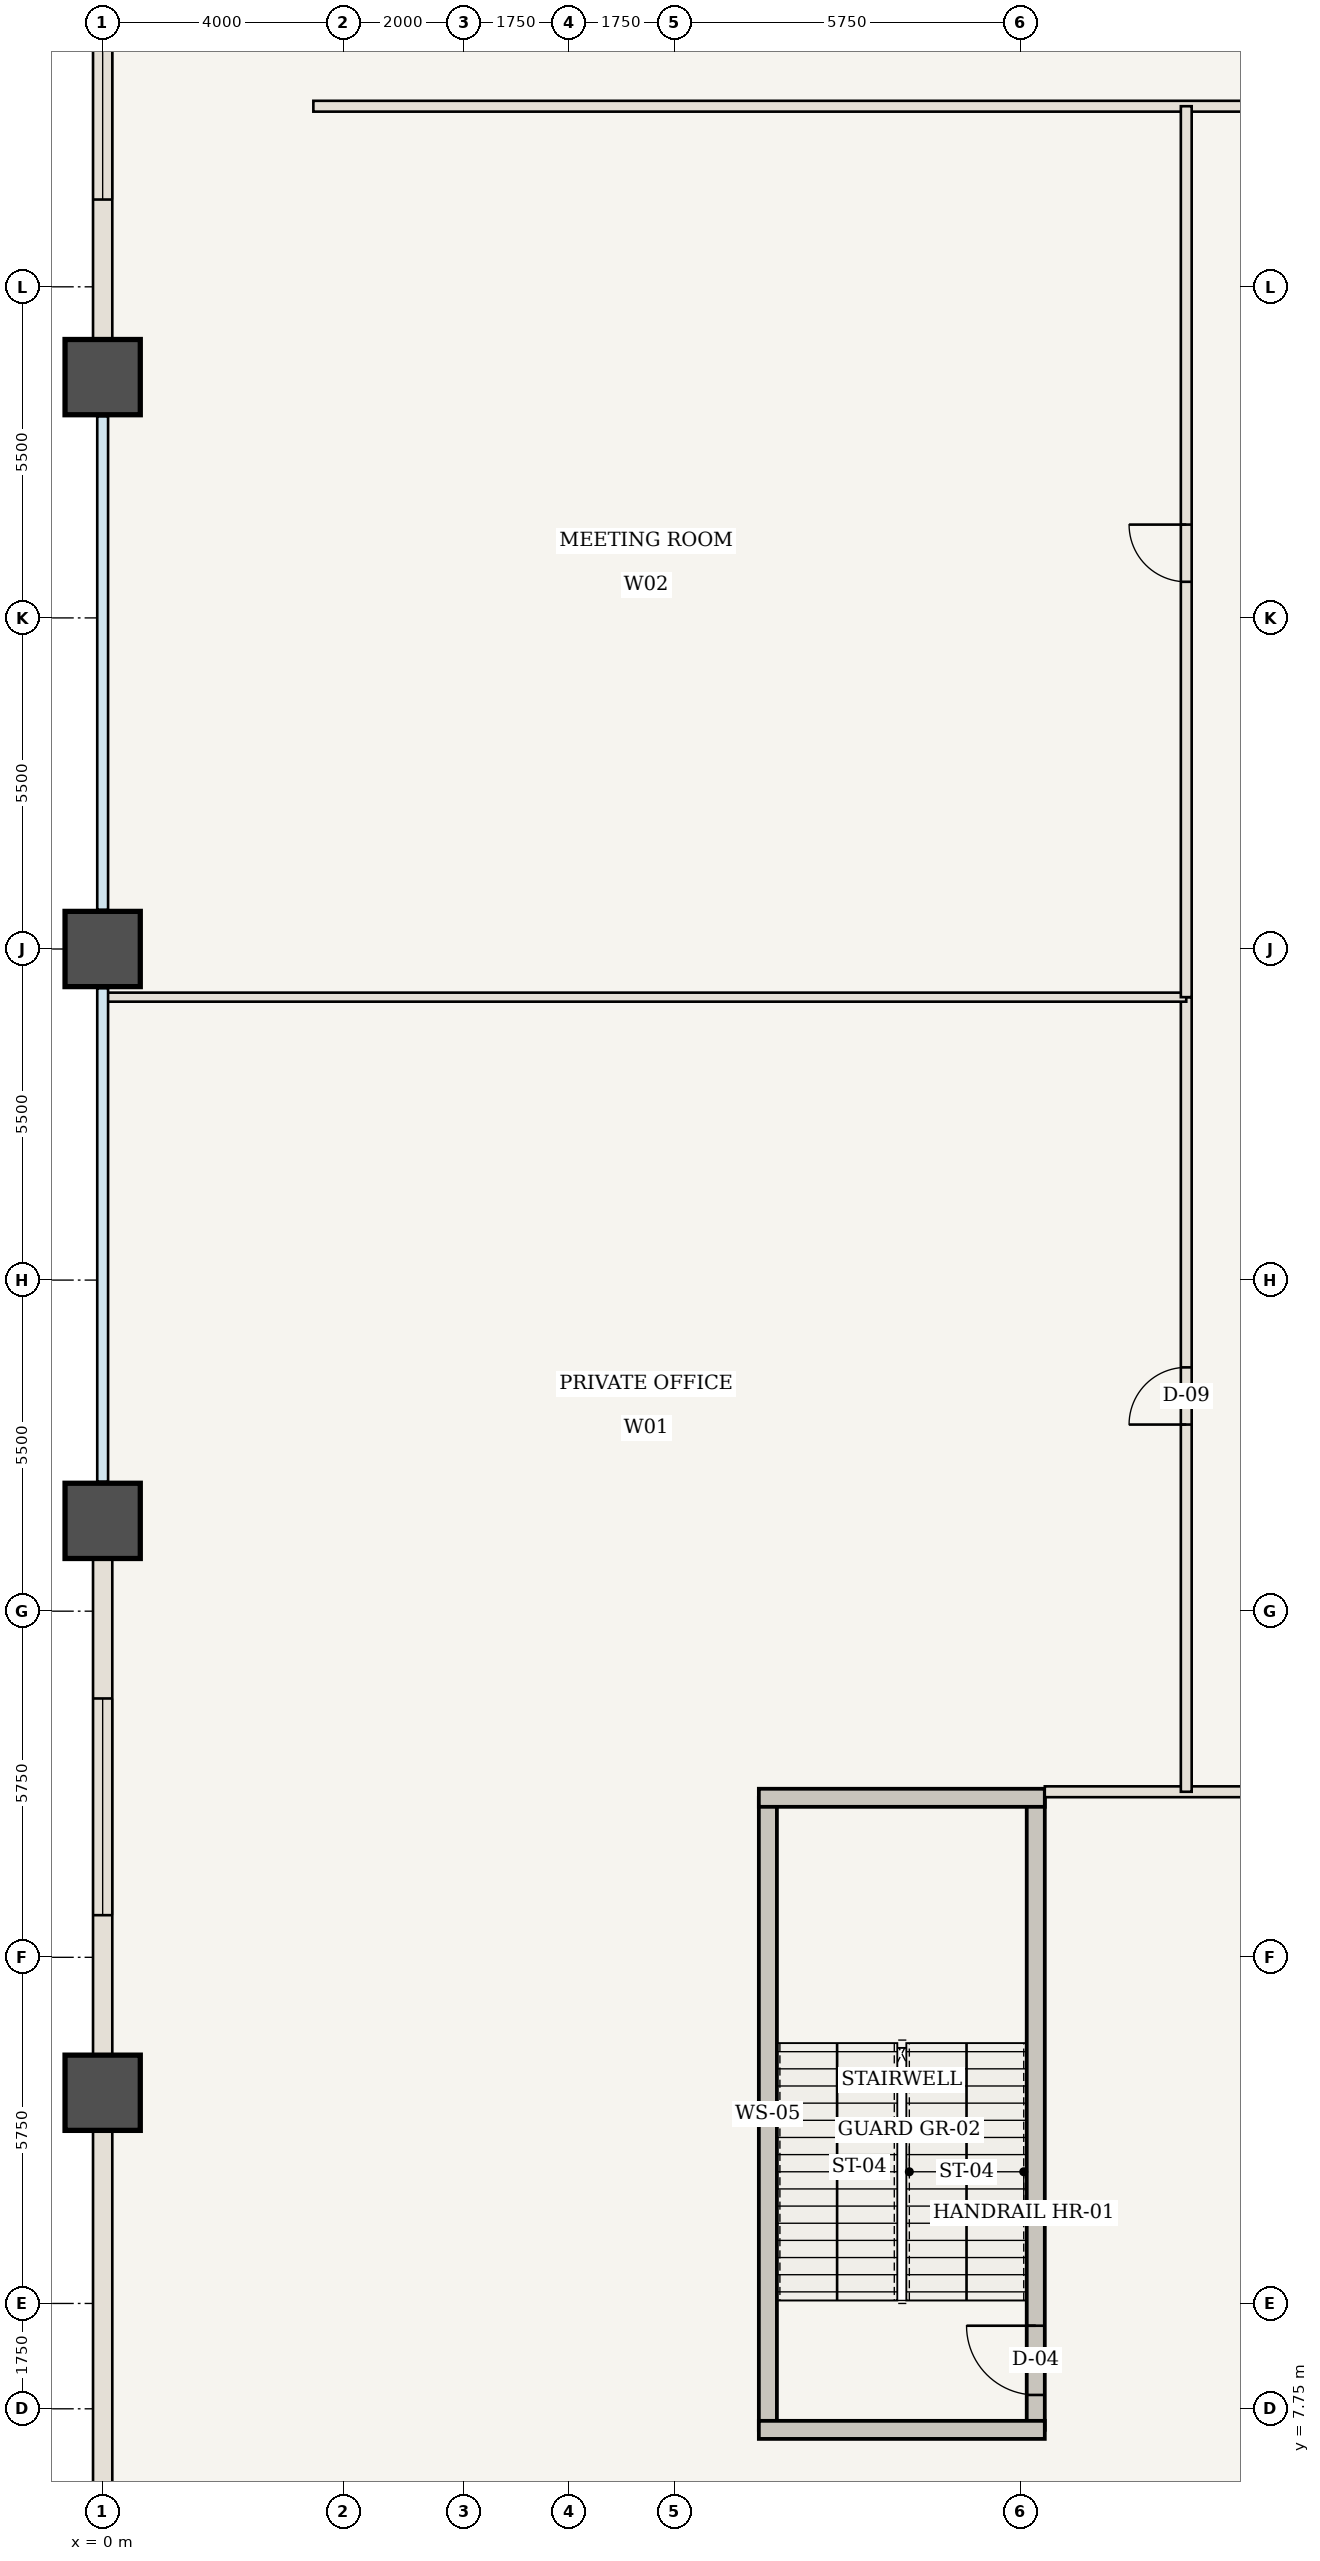
"""IFC4 building model, lengths in metres.
Left out: names, types, materials, properties, quantities, classifications, styles, units other than length and angle.
Written with IfcOpenShell. Run it as: python <this file> out.ifc"""

import sys

from ifc_helpers import new_model, si_unit, direction, frame, frame_2d, origin, origin_2d, place, context, subcontext, project, spatial, rectangle, extrude, element, fill, save


model = new_model("IFC4")
c1 = context("Model", 3, precision=1e-05, world=origin(), true_north=direction((0.0, 1.0)))
c2 = subcontext(c1, "Body", "Model", "MODEL_VIEW")
j1 = project(units=[si_unit("LENGTHUNIT", "METRE"), si_unit("PLANEANGLEUNIT", "RADIAN")], contexts=[c1])
p1 = place(None, origin())
s1 = spatial("IfcSite", under=j1, at=p1, CompositionType="ELEMENT")
p2 = place(p1, origin())
s2 = spatial("IfcBuilding", under=s1, at=p2, CompositionType="ELEMENT")
p3 = place(p2, frame((0.0, 0.0, 6.65)))
s3 = spatial("IfcBuildingStorey", under=s2, at=p3, CompositionType="ELEMENT", Elevation=6.65)
for number, where, z_axis, x_axis in (
    (1, (0.0, 13.0, 0.0), (0.0, 0.0, 1.0), (1.0, 0.0, 0.0)),
    (2, (0.0, 22.5, 0.0), (0.0, 0.0, 1.0), (1.0, 0.0, 0.0)),
    (3, (0.0, 32.0, 0.0), (0.0, 0.0, 1.0), (1.0, 0.0, 0.0)),
    (4, (0.0, 41.5, 0.0), (0.0, 0.0, 1.0), (1.0, 0.0, 0.0)),
):
    element("IfcColumn", number, at=place(p3, frame(where, z_axis=z_axis, x_axis=x_axis)), inside=s3, PredefinedType="COLUMN", context=c2, shape_type="SweptSolid", body=[
        extrude(rectangle(XDim=1.25, YDim=1.25, at=origin_2d()), origin(), (0.0, 0.0, 1.0), 5.6),
    ])
p4 = place(p3, frame((11.05, 7.4, 0.0), z_axis=(0.0, 0.0, 1.0), x_axis=(0.0, 1.0, 0.0)))
e5 = element("IfcWall", 5, at=p4, inside=s3, PredefinedType="SHEAR", context=c2, shape_type="SweptSolid", body=[
    extrude(rectangle(XDim=10.5, YDim=0.3, at=frame_2d((5.25, 0.0))), origin(), (0.0, 0.0, 1.0), 5.36),
])
p5 = place(p3, frame((15.5, 7.4, 0.0), z_axis=(0.0, 0.0, 1.0), x_axis=(0.0, 1.0, 0.0)))
e6 = element("IfcWall", 6, at=p5, inside=s3, PredefinedType="SHEAR", context=c2, shape_type="SweptSolid", body=[
    extrude(rectangle(XDim=10.5, YDim=0.3, at=frame_2d((5.25, 0.0))), origin(), (0.0, 0.0, 1.0), 5.36),
])
p6 = place(p5, frame((0.58, 0.0, 0.0)))
e7 = element("IfcOpeningElement", 7, at=p6, cuts=e6, PredefinedType="OPENING", context=c2, shape_type="SweptSolid", body=[
    extrude(rectangle(XDim=1.15, YDim=2.15, at=frame_2d((0.575, 1.075))), frame((0.0, 0.16, 0.0), z_axis=(0.0, -1.0, 0.0), x_axis=(1.0, 0.0, 0.0)), (0.0, 0.0, 1.0), 0.32),
])
for number, where, z_axis, x_axis in (
    (8, (10.9, 7.4, 0.0), (0.0, 0.0, 1.0), (1.0, 0.0, 0.0)),
    (9, (10.9, 17.9, 0.0), (0.0, 0.0, 1.0), (1.0, 0.0, 0.0)),
):
    element("IfcWall", number, at=place(p3, frame(where, z_axis=z_axis, x_axis=x_axis)), inside=s3, PredefinedType="SHEAR", context=c2, shape_type="SweptSolid", body=[
        extrude(rectangle(XDim=4.75, YDim=0.3, at=frame_2d((2.375, 0.0))), origin(), (0.0, 0.0, 1.0), 5.36),
    ])
p7 = place(p3, frame((15.65, 18.0, 0.0), z_axis=(0.0, 0.0, 1.0), x_axis=(1.0, 0.0, 0.0)))
e10 = element("IfcWall", 10, at=p7, inside=s3, PredefinedType="STANDARD", context=c2, shape_type="SweptSolid", body=[
    extrude(rectangle(XDim=22.35, YDim=0.18, at=frame_2d((11.175, 0.0))), origin(), (0.0, 0.0, 1.0), 5.36),
])
p8 = place(p7, frame((13.325, 0.0, 0.0)))
e11 = element("IfcOpeningElement", 11, at=p8, cuts=e10, PredefinedType="OPENING", context=c2, shape_type="SweptSolid", body=[
    extrude(rectangle(XDim=1.8, YDim=2.35, at=frame_2d((0.9, 1.175))), frame((0.0, 0.1, 0.0), z_axis=(0.0, -1.0, 0.0), x_axis=(1.0, 0.0, 0.0)), (0.0, 0.0, 1.0), 0.2),
])
p9 = place(p3, frame((3.5, 46.0, 0.0), z_axis=(0.0, 0.0, 1.0), x_axis=(1.0, 0.0, 0.0)))
e12 = element("IfcWall", 12, at=p9, inside=s3, PredefinedType="STANDARD", context=c2, shape_type="SweptSolid", body=[
    extrude(rectangle(XDim=19.5, YDim=0.18, at=frame_2d((9.75, 0.0))), origin(), (0.0, 0.0, 1.0), 5.36),
])
p10 = place(p9, frame((16.525, 0.0, 0.0)))
e13 = element("IfcOpeningElement", 13, at=p10, cuts=e12, PredefinedType="OPENING", context=c2, shape_type="SweptSolid", body=[
    extrude(rectangle(XDim=1.8, YDim=2.35, at=frame_2d((0.9, 1.175))), frame((0.0, 0.1, 0.0), z_axis=(0.0, -1.0, 0.0), x_axis=(1.0, 0.0, 0.0)), (0.0, 0.0, 1.0), 0.2),
])
p11 = place(p3, frame((18.0, 18.0, 0.0), z_axis=(0.0, 0.0, 1.0), x_axis=(0.0, 1.0, 0.0)))
e14 = element("IfcWall", 14, at=p11, inside=s3, PredefinedType="STANDARD", context=c2, shape_type="SweptSolid", body=[
    extrude(rectangle(XDim=13.2, YDim=0.18, at=frame_2d((6.6, 0.0))), origin(), (0.0, 0.0, 1.0), 5.36),
])
p12 = place(p11, frame((6.1, 0.0, 0.0)))
e15 = element("IfcOpeningElement", 15, at=p12, cuts=e14, PredefinedType="OPENING", context=c2, shape_type="SweptSolid", body=[
    extrude(rectangle(XDim=0.95, YDim=2.15, at=frame_2d((0.475, 1.075))), frame((0.0, 0.1, 0.0), z_axis=(0.0, -1.0, 0.0), x_axis=(1.0, 0.0, 0.0)), (0.0, 0.0, 1.0), 0.2),
])
p13 = place(p3, frame((0.06, 31.2, 0.0), z_axis=(0.0, 0.0, 1.0), x_axis=(1.0, 0.0, 0.0)))
e16 = element("IfcWall", 16, at=p13, inside=s3, PredefinedType="STANDARD", context=c2, shape_type="SweptSolid", body=[
    extrude(rectangle(XDim=17.94, YDim=0.15, at=frame_2d((8.97, 0.0))), origin(), (0.0, 0.0, 1.0), 5.36),
])
p14 = place(p3, frame((18.0, 31.2, 0.0), z_axis=(0.0, 0.0, 1.0), x_axis=(0.0, 1.0, 0.0)))
e17 = element("IfcWall", 17, at=p14, inside=s3, PredefinedType="STANDARD", context=c2, shape_type="SweptSolid", body=[
    extrude(rectangle(XDim=14.8, YDim=0.18, at=frame_2d((7.4, 0.0))), origin(), (0.0, 0.0, 1.0), 5.36),
])
p15 = place(p14, frame((6.9, 0.0, 0.0)))
e18 = element("IfcOpeningElement", 18, at=p15, cuts=e17, PredefinedType="OPENING", context=c2, shape_type="SweptSolid", body=[
    extrude(rectangle(XDim=0.95, YDim=2.15, at=frame_2d((0.475, 1.075))), frame((0.0, 0.1, 0.0), z_axis=(0.0, -1.0, 0.0), x_axis=(1.0, 0.0, 0.0)), (0.0, 0.0, 1.0), 0.2),
])
p16 = place(p3, frame((0.0, 3.5, 0.0), z_axis=(0.0, 0.0, 1.0), x_axis=(0.0, 1.0, 0.0)))
e19 = element("IfcWall", 19, at=p16, inside=s3, PredefinedType="USERDEFINED", context=c2, shape_type="SweptSolid", body=[
    extrude(rectangle(XDim=9.5, YDim=0.32, at=frame_2d((4.75, 0.0))), origin(), (0.0, 0.0, 1.0), 4.46),
])
p17 = place(p3, frame((0.0, 13.0, 0.0), z_axis=(0.0, 0.0, 1.0), x_axis=(0.0, 1.0, 0.0)))
e20 = element("IfcWall", 20, at=p17, inside=s3, PredefinedType="USERDEFINED", context=c2, shape_type="SweptSolid", body=[
    extrude(rectangle(XDim=9.5, YDim=0.32, at=frame_2d((4.75, 0.0))), origin(), (0.0, 0.0, 1.0), 4.46),
])
p18 = place(p17, frame((2.95, 0.0, 0.85)))
e21 = element("IfcOpeningElement", 21, at=p18, cuts=e20, PredefinedType="OPENING", context=c2, shape_type="SweptSolid", body=[
    extrude(rectangle(XDim=3.6, YDim=2.6, at=frame_2d((1.8, 1.3))), frame((0.0, 0.17, 0.0), z_axis=(0.0, -1.0, 0.0), x_axis=(1.0, 0.0, 0.0)), (0.0, 0.0, 1.0), 0.34),
])
p19 = place(p3, frame((0.0, 41.5, 0.0), z_axis=(0.0, 0.0, 1.0), x_axis=(0.0, 1.0, 0.0)))
e22 = element("IfcWall", 22, at=p19, inside=s3, PredefinedType="USERDEFINED", context=c2, shape_type="SweptSolid", body=[
    extrude(rectangle(XDim=9.5, YDim=0.32, at=frame_2d((4.75, 0.0))), origin(), (0.0, 0.0, 1.0), 4.46),
])
p20 = place(p19, frame((2.95, 0.0, 0.85)))
e23 = element("IfcOpeningElement", 23, at=p20, cuts=e22, PredefinedType="OPENING", context=c2, shape_type="SweptSolid", body=[
    extrude(rectangle(XDim=3.6, YDim=2.6, at=frame_2d((1.8, 1.3))), frame((0.0, 0.17, 0.0), z_axis=(0.0, -1.0, 0.0), x_axis=(1.0, 0.0, 0.0)), (0.0, 0.0, 1.0), 0.34),
])
p21 = place(p6, origin())
e24 = element("IfcDoor", 24, at=p21, inside=s3, OperationType="SINGLE_SWING_RIGHT", PredefinedType="DOOR", context=c2, shape_type="SweptSolid", body=[
    extrude(rectangle(XDim=1.15, YDim=2.15, at=frame_2d((0.575, 1.075))), frame((0.0, 0.025, 0.0), z_axis=(0.0, -1.0, 0.0), x_axis=(1.0, 0.0, 0.0)), (0.0, 0.0, 1.0), 0.05),
])
fill(e7, e24)
p22 = place(p12, origin())
e25 = element("IfcDoor", 25, at=p22, inside=s3, OperationType="SINGLE_SWING_LEFT", PredefinedType="DOOR", context=c2, shape_type="SweptSolid", body=[
    extrude(rectangle(XDim=0.95, YDim=2.15, at=frame_2d((0.475, 1.075))), frame((0.0, 0.025, 0.0), z_axis=(0.0, -1.0, 0.0), x_axis=(1.0, 0.0, 0.0)), (0.0, 0.0, 1.0), 0.05),
])
fill(e15, e25)
p23 = place(p15, origin())
e26 = element("IfcDoor", 26, at=p23, inside=s3, OperationType="SINGLE_SWING_RIGHT", PredefinedType="DOOR", context=c2, shape_type="SweptSolid", body=[
    extrude(rectangle(XDim=0.95, YDim=2.15, at=frame_2d((0.475, 1.075))), frame((0.0, 0.025, 0.0), z_axis=(0.0, -1.0, 0.0), x_axis=(1.0, 0.0, 0.0)), (0.0, 0.0, 1.0), 0.05),
])
fill(e18, e26)
p24 = place(p18, origin())
e27 = element("IfcWindow", 27, at=p24, inside=s3, PartitioningType="SINGLE_PANEL", PredefinedType="WINDOW", context=c2, shape_type="SweptSolid", body=[
    extrude(rectangle(XDim=3.6, YDim=2.6, at=frame_2d((1.8, 1.3))), frame((0.0, 0.03, 0.0), z_axis=(0.0, -1.0, 0.0), x_axis=(1.0, 0.0, 0.0)), (0.0, 0.0, 1.0), 0.06),
])
fill(e21, e27)
p25 = place(p20, origin())
e28 = element("IfcWindow", 28, at=p25, inside=s3, PartitioningType="SINGLE_PANEL", PredefinedType="WINDOW", context=c2, shape_type="SweptSolid", body=[
    extrude(rectangle(XDim=3.6, YDim=2.6, at=frame_2d((1.8, 1.3))), frame((0.0, 0.03, 0.0), z_axis=(0.0, -1.0, 0.0), x_axis=(1.0, 0.0, 0.0)), (0.0, 0.0, 1.0), 0.06),
])
fill(e23, e28)
save(model, sys.argv[1])
